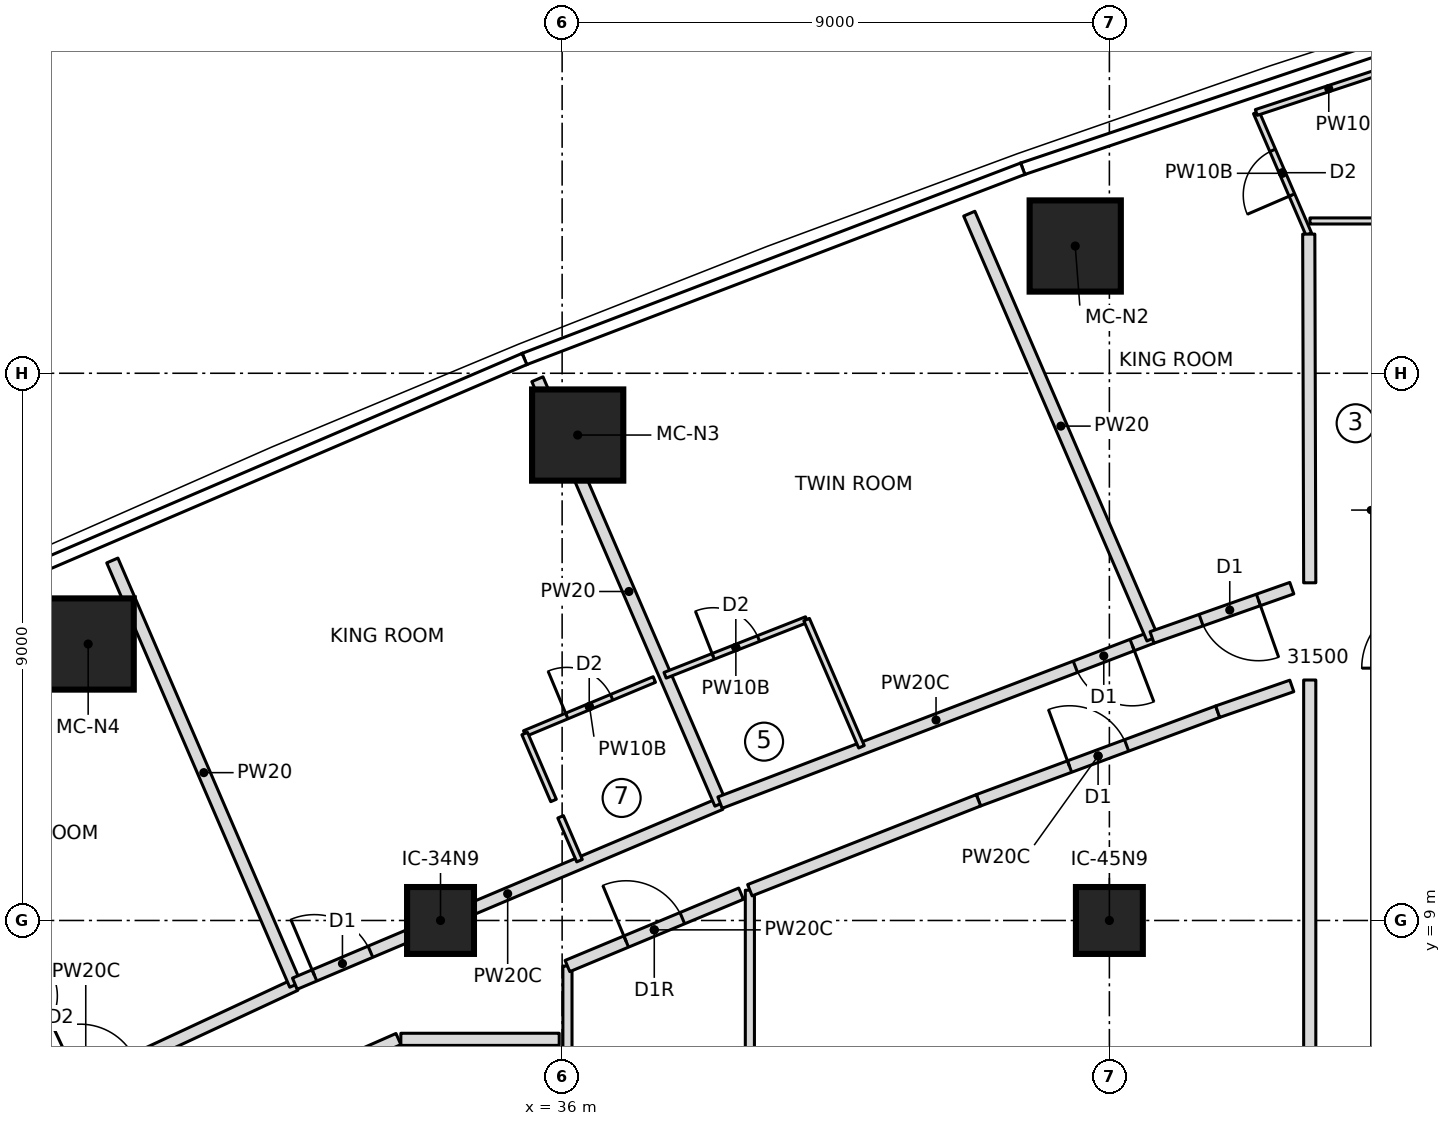
"""IFC4 building model, lengths in metres.
Left out: names, types, materials, properties, quantities, classifications, styles, units other than length and angle.
Written with IfcOpenShell. Run it as: python <this file> out.ifc"""

import sys

from ifc_helpers import new_model, si_unit, direction, frame, frame_2d, origin, origin_2d, place, context, subcontext, project, spatial, rectangle, extrude, element, fill, save


model = new_model("IFC4")
c1 = context("Model", 3, precision=1e-05, world=origin(), true_north=direction((0.0, 1.0)))
c2 = subcontext(c1, "Body", "Model", "MODEL_VIEW")
j1 = project(units=[si_unit("LENGTHUNIT", "METRE"), si_unit("PLANEANGLEUNIT", "RADIAN")], contexts=[c1])
p1 = place(None, origin())
s1 = spatial("IfcSite", under=j1, at=p1, CompositionType="ELEMENT")
p2 = place(p1, origin())
s2 = spatial("IfcBuilding", under=s1, at=p2, CompositionType="ELEMENT")
p3 = place(p2, frame((0.0, 0.0, 162.15)))
s3 = spatial("IfcBuildingStorey", under=s2, at=p3, CompositionType="ELEMENT", Elevation=162.15)
for number, where, z_axis, x_axis in (
    (1, (44.438, 20.093, 0.0), (0.0, 0.0, 1.0), (1.0, 0.0, 0.0)),
    (2, (36.256, 16.984, 0.0), (0.0, 0.0, 1.0), (1.0, 0.0, 0.0)),
    (3, (28.205, 13.547, 0.0), (0.0, 0.0, 1.0), (1.0, 0.0, 0.0)),
):
    element("IfcColumn", number, at=place(p3, frame(where, z_axis=z_axis, x_axis=x_axis)), inside=s3, PredefinedType="COLUMN", context=c2, shape_type="SweptSolid", body=[
        extrude(rectangle(XDim=1.5, YDim=1.5, at=origin_2d()), origin(), (0.0, 0.0, 1.0), 3.55),
    ])
for number, where, z_axis, x_axis in (
    (4, (34.0, 9.0, 0.0), (0.0, 0.0, 1.0), (1.0, 0.0, 0.0)),
    (5, (45.0, 9.0, 0.0), (0.0, 0.0, 1.0), (1.0, 0.0, 0.0)),
):
    element("IfcColumn", number, at=place(p3, frame(where, z_axis=z_axis, x_axis=x_axis)), inside=s3, PredefinedType="COLUMN", context=c2, shape_type="SweptSolid", body=[
        extrude(rectangle(XDim=1.1, YDim=1.1, at=origin_2d()), origin(), (0.0, 0.0, 1.0), 3.55),
    ])
p4 = place(p3, frame((24.719, 4.733, 0.0), z_axis=(0.0, 0.0, 1.0), x_axis=(0.906593711122, 0.422004553238, 0.0)))
e6 = element("IfcWall", 6, at=p4, inside=s3, PredefinedType="PARTITIONING", context=c2, shape_type="SweptSolid", body=[
    extrude(rectangle(XDim=7.603, YDim=0.2, at=frame_2d((3.802, 0.0))), origin(), (0.0, 0.0, 1.0), 3.15),
])
p5 = place(p4, frame((3.7, 0.0, 0.0)))
e7 = element("IfcOpeningElement", 7, at=p5, cuts=e6, PredefinedType="OPENING", context=c2, shape_type="SweptSolid", body=[
    extrude(rectangle(XDim=1.0, YDim=2.1, at=frame_2d((0.5, 1.05))), frame((0.0, 0.11, 0.0), z_axis=(0.0, -1.0, 0.0), x_axis=(1.0, 0.0, 0.0)), (0.0, 0.0, 1.0), 0.22),
])
p6 = place(p3, frame((26.503, 8.679, 0.0), z_axis=(0.0, 0.0, 1.0), x_axis=(0.396018464604, -0.918242547311, 0.0)))
e8 = element("IfcWall", 8, at=p6, inside=s3, PredefinedType="PARTITIONING", context=c2, shape_type="SweptSolid", body=[
    extrude(rectangle(XDim=2.778, YDim=0.1, at=frame_2d((1.389, 0.0))), origin(), (0.0, 0.0, 1.0), 3.15),
])
p7 = place(p6, frame((1.0, 0.0, 0.0)))
e9 = element("IfcOpeningElement", 9, at=p7, cuts=e8, PredefinedType="OPENING", context=c2, shape_type="SweptSolid", body=[
    extrude(rectangle(XDim=0.8, YDim=2.1, at=frame_2d((0.4, 1.05))), frame((0.0, 0.06, 0.0), z_axis=(0.0, -1.0, 0.0), x_axis=(1.0, 0.0, 0.0)), (0.0, 0.0, 1.0), 0.12),
])
p8 = place(p3, frame((31.612, 7.942, 0.0), z_axis=(0.0, 0.0, 1.0), x_axis=(-0.395976934703, 0.91826045716, 0.0)))
e10 = element("IfcWall", 10, at=p8, inside=s3, PredefinedType="PARTITIONING", context=c2, shape_type="SweptSolid", body=[
    extrude(rectangle(XDim=7.6, YDim=0.2, at=frame_2d((3.8, 0.0))), origin(), (0.0, 0.0, 1.0), 3.15),
])
p9 = place(p3, frame((31.604, 7.96, 0.0), z_axis=(0.0, 0.0, 1.0), x_axis=(0.921069634751, 0.389397904386, 0.0)))
e11 = element("IfcWall", 11, at=p9, inside=s3, PredefinedType="PARTITIONING", context=c2, shape_type="SweptSolid", body=[
    extrude(rectangle(XDim=7.6, YDim=0.2, at=frame_2d((3.8, 0.0))), origin(), (0.0, 0.0, 1.0), 3.15),
])
p10 = place(p9, frame((0.35, 0.0, 0.0)))
e12 = element("IfcOpeningElement", 12, at=p10, cuts=e11, PredefinedType="OPENING", context=c2, shape_type="SweptSolid", body=[
    extrude(rectangle(XDim=1.0, YDim=2.1, at=frame_2d((0.5, 1.05))), frame((0.0, 0.11, 0.0), z_axis=(0.0, -1.0, 0.0), x_axis=(1.0, 0.0, 0.0)), (0.0, 0.0, 1.0), 0.22),
])
p11 = place(p3, frame((35.384, 12.074, 0.0), z_axis=(0.0, 0.0, 1.0), x_axis=(0.923014363649, 0.384765492863, 0.0)))
e13 = element("IfcWall", 13, at=p11, inside=s3, PredefinedType="PARTITIONING", context=c2, shape_type="SweptSolid", body=[
    extrude(rectangle(XDim=2.31, YDim=0.1, at=frame_2d((1.155, 0.0))), origin(), (0.0, 0.0, 1.0), 3.15),
])
p12 = place(p11, frame((0.75, 0.0, 0.0)))
e14 = element("IfcOpeningElement", 14, at=p12, cuts=e13, PredefinedType="OPENING", context=c2, shape_type="SweptSolid", body=[
    extrude(rectangle(XDim=0.8, YDim=2.1, at=frame_2d((0.4, 1.05))), frame((0.0, 0.06, 0.0), z_axis=(0.0, -1.0, 0.0), x_axis=(1.0, 0.0, 0.0)), (0.0, 0.0, 1.0), 0.12),
])
p13 = place(p3, frame((36.286, 9.983, 0.0), z_axis=(0.0, 0.0, 1.0), x_axis=(-0.396019167007, 0.918242244379, 0.0)))
e15 = element("IfcWall", 15, at=p13, inside=s3, PredefinedType="PARTITIONING", context=c2, shape_type="SweptSolid", body=[
    extrude(rectangle(XDim=0.785, YDim=0.1, at=frame_2d((0.393, 0.0))), origin(), (0.0, 0.0, 1.0), 3.15),
])
p14 = place(p3, frame((35.859, 10.974, 0.0), z_axis=(0.0, 0.0, 1.0), x_axis=(-0.396057430794, 0.918225741043, 0.0)))
e16 = element("IfcWall", 16, at=p14, inside=s3, PredefinedType="PARTITIONING", context=c2, shape_type="SweptSolid", body=[
    extrude(rectangle(XDim=1.198, YDim=0.1, at=frame_2d((0.599, 0.0))), origin(), (0.0, 0.0, 1.0), 3.15),
])
p15 = place(p3, frame((38.604, 10.92, 0.0), z_axis=(0.0, 0.0, 1.0), x_axis=(-0.395975928923, 0.918260890877, 0.0)))
e17 = element("IfcWall", 17, at=p15, inside=s3, PredefinedType="PARTITIONING", context=c2, shape_type="SweptSolid", body=[
    extrude(rectangle(XDim=7.604, YDim=0.2, at=frame_2d((3.802, 0.0))), origin(), (0.0, 0.0, 1.0), 3.15),
])
p16 = place(p3, frame((45.702, 13.655, 0.0), z_axis=(0.0, 0.0, 1.0), x_axis=(-0.934032939798, -0.35718688018, 0.0)))
e18 = element("IfcWall", 18, at=p16, inside=s3, PredefinedType="PARTITIONING", context=c2, shape_type="SweptSolid", body=[
    extrude(rectangle(XDim=7.607, YDim=0.2, at=frame_2d((3.803, 0.0))), origin(), (0.0, 0.0, 1.0), 3.15),
])
p17 = place(p16, frame((0.35, 0.0, 0.0)))
e19 = element("IfcOpeningElement", 19, at=p17, cuts=e18, PredefinedType="OPENING", context=c2, shape_type="SweptSolid", body=[
    extrude(rectangle(XDim=1.0, YDim=2.1, at=frame_2d((0.5, 1.05))), frame((0.0, 0.11, 0.0), z_axis=(0.0, -1.0, 0.0), x_axis=(1.0, 0.0, 0.0)), (0.0, 0.0, 1.0), 0.22),
])
p18 = place(p3, frame((37.693, 13.033, 0.0), z_axis=(0.0, 0.0, 1.0), x_axis=(0.930568677441, 0.366117380856, 0.0)))
e20 = element("IfcWall", 20, at=p18, inside=s3, PredefinedType="PARTITIONING", context=c2, shape_type="SweptSolid", body=[
    extrude(rectangle(XDim=2.501, YDim=0.1, at=frame_2d((1.25, 0.0))), origin(), (0.0, 0.0, 1.0), 3.15),
])
p19 = place(p18, frame((0.85, 0.0, 0.0)))
e21 = element("IfcOpeningElement", 21, at=p19, cuts=e20, PredefinedType="OPENING", context=c2, shape_type="SweptSolid", body=[
    extrude(rectangle(XDim=0.8, YDim=2.1, at=frame_2d((0.4, 1.05))), frame((0.0, 0.06, 0.0), z_axis=(0.0, -1.0, 0.0), x_axis=(1.0, 0.0, 0.0)), (0.0, 0.0, 1.0), 0.12),
])
p20 = place(p3, frame((40.021, 13.948, 0.0), z_axis=(0.0, 0.0, 1.0), x_axis=(0.39596178423, -0.918266990275, 0.0)))
e22 = element("IfcWall", 22, at=p20, inside=s3, PredefinedType="PARTITIONING", context=c2, shape_type="SweptSolid", body=[
    extrude(rectangle(XDim=2.278, YDim=0.1, at=frame_2d((1.139, 0.0))), origin(), (0.0, 0.0, 1.0), 3.15),
])
p21 = place(p3, frame((45.709, 13.637, 0.0), z_axis=(0.0, 0.0, 1.0), x_axis=(-0.395993528256, 0.918253301426, 0.0)))
e23 = element("IfcWall", 23, at=p21, inside=s3, PredefinedType="PARTITIONING", context=c2, shape_type="SweptSolid", body=[
    extrude(rectangle(XDim=7.61, YDim=0.2, at=frame_2d((3.805, 0.0))), origin(), (0.0, 0.0, 1.0), 3.15),
])
p22 = place(p3, frame((48.279, 20.289, 0.0), z_axis=(0.0, 0.0, 1.0), x_axis=(-0.396028123143, 0.918238381729, 0.0)))
e24 = element("IfcWall", 24, at=p22, inside=s3, PredefinedType="PARTITIONING", context=c2, shape_type="SweptSolid", body=[
    extrude(rectangle(XDim=2.179, YDim=0.1, at=frame_2d((1.089, 0.0))), origin(), (0.0, 0.0, 1.0), 3.15),
])
p23 = place(p22, frame((0.7, 0.0, 0.0)))
e25 = element("IfcOpeningElement", 25, at=p23, cuts=e24, PredefinedType="OPENING", context=c2, shape_type="SweptSolid", body=[
    extrude(rectangle(XDim=0.8, YDim=2.1, at=frame_2d((0.4, 1.05))), frame((0.0, 0.06, 0.0), z_axis=(0.0, -1.0, 0.0), x_axis=(1.0, 0.0, 0.0)), (0.0, 0.0, 1.0), 0.12),
])
p24 = place(p3, frame((31.231, 6.135, 0.0), z_axis=(0.0, 0.0, 1.0), x_axis=(0.915102334452, 0.403221672881, 0.0)))
e26 = element("IfcWall", 26, at=p24, inside=s3, PredefinedType="PARTITIONING", context=c2, shape_type="SweptSolid", body=[
    extrude(rectangle(XDim=2.269, YDim=0.2, at=frame_2d((1.135, 0.0))), origin(), (0.0, 0.0, 1.0), 3.15),
])
p25 = place(p3, frame((36.087, -8.25, 0.0), z_axis=(0.0, 0.0, 1.0), x_axis=(0.0, 1.0, 0.0)))
e27 = element("IfcWall", 27, at=p25, inside=s3, PredefinedType="PARTITIONING", context=c2, shape_type="SweptSolid", body=[
    extrude(rectangle(XDim=16.501, YDim=0.15, at=frame_2d((8.25, 0.0))), origin(), (0.0, 0.0, 1.0), 3.15),
])
p26 = place(p3, frame((36.087, 8.25, 0.0), z_axis=(0.0, 0.0, 1.0), x_axis=(0.923013875818, 0.384766663118, 0.0)))
e28 = element("IfcWall", 28, at=p26, inside=s3, PredefinedType="PARTITIONING", context=c2, shape_type="SweptSolid", body=[
    extrude(rectangle(XDim=3.094, YDim=0.2, at=frame_2d((1.547, 0.0))), origin(), (0.0, 0.0, 1.0), 3.15),
])
p27 = place(p26, frame((1.047, 0.0, 0.0)))
e29 = element("IfcOpeningElement", 29, at=p27, cuts=e28, PredefinedType="OPENING", context=c2, shape_type="SweptSolid", body=[
    extrude(rectangle(XDim=1.0, YDim=2.1, at=frame_2d((0.5, 1.05))), frame((0.0, 0.11, 0.0), z_axis=(0.0, -1.0, 0.0), x_axis=(1.0, 0.0, 0.0)), (0.0, 0.0, 1.0), 0.22),
])
p28 = place(p3, frame((39.087, -9.498, 0.0), z_axis=(0.0, 0.0, 1.0), x_axis=(0.0, 1.0, 0.0)))
e30 = element("IfcWall", 30, at=p28, inside=s3, PredefinedType="PARTITIONING", context=c2, shape_type="SweptSolid", body=[
    extrude(rectangle(XDim=18.996, YDim=0.15, at=frame_2d((9.498, 0.0))), origin(), (0.0, 0.0, 1.0), 3.15),
])
p29 = place(p3, frame((42.847, 10.977, 0.0), z_axis=(0.0, 0.0, 1.0), x_axis=(0.937732614305, 0.347357948044, 0.0)))
e31 = element("IfcWall", 31, at=p29, inside=s3, PredefinedType="PARTITIONING", context=c2, shape_type="SweptSolid", body=[
    extrude(rectangle(XDim=4.195, YDim=0.2, at=frame_2d((2.098, 0.0))), origin(), (0.0, 0.0, 1.0), 3.15),
])
p30 = place(p29, frame((1.598, 0.0, 0.0)))
e32 = element("IfcOpeningElement", 32, at=p30, cuts=e31, PredefinedType="OPENING", context=c2, shape_type="SweptSolid", body=[
    extrude(rectangle(XDim=1.0, YDim=2.1, at=frame_2d((0.5, 1.05))), frame((0.0, 0.11, 0.0), z_axis=(0.0, -1.0, 0.0), x_axis=(1.0, 0.0, 0.0)), (0.0, 0.0, 1.0), 0.22),
])
p31 = place(p3, frame((39.087, 9.498, 0.0), z_axis=(0.0, 0.0, 1.0), x_axis=(0.930586875578, 0.366071122873, 0.0)))
e33 = element("IfcWall", 33, at=p31, inside=s3, PredefinedType="PARTITIONING", context=c2, shape_type="SweptSolid", body=[
    extrude(rectangle(XDim=4.04, YDim=0.2, at=frame_2d((2.02, 0.0))), origin(), (0.0, 0.0, 1.0), 3.15),
])
p32 = place(p3, frame((49.434, 20.505, 0.0), z_axis=(0.0, 0.0, 1.0), x_axis=(-1.0, 0.0, 0.0)))
e34 = element("IfcWall", 34, at=p32, inside=s3, PredefinedType="PARTITIONING", context=c2, shape_type="SweptSolid", body=[
    extrude(rectangle(XDim=1.135, YDim=0.1, at=frame_2d((0.568, 0.0))), origin(), (0.0, 0.0, 1.0), 3.15),
])
p33 = place(p3, frame((47.416, 22.289, 0.0), z_axis=(0.0, 0.0, 1.0), x_axis=(0.949844078437, 0.312723882455, 0.0)))
e35 = element("IfcWall", 35, at=p33, inside=s3, PredefinedType="PARTITIONING", context=c2, shape_type="SweptSolid", body=[
    extrude(rectangle(XDim=2.51, YDim=0.1, at=frame_2d((1.255, 0.0))), origin(), (0.0, 0.0, 1.0), 3.15),
])
p34 = place(p3, frame((48.0, 14.466, 0.0), z_axis=(0.0, 0.0, 1.0), x_axis=(-0.94307168041, -0.332589545248, 0.0)))
e36 = element("IfcWall", 36, at=p34, inside=s3, PredefinedType="PARTITIONING", context=c2, shape_type="SweptSolid", body=[
    extrude(rectangle(XDim=2.437, YDim=0.2, at=frame_2d((1.219, 0.0))), origin(), (0.0, 0.0, 1.0), 3.15),
])
p35 = place(p34, frame((0.582, 0.0, 0.0)))
e37 = element("IfcOpeningElement", 37, at=p35, cuts=e36, PredefinedType="OPENING", context=c2, shape_type="SweptSolid", body=[
    extrude(rectangle(XDim=1.0, YDim=2.1, at=frame_2d((0.5, 1.05))), frame((0.0, 0.11, 0.0), z_axis=(0.0, -1.0, 0.0), x_axis=(1.0, 0.0, 0.0)), (0.0, 0.0, 1.0), 0.22),
])
p36 = place(p3, frame((46.781, 12.434, 0.0), z_axis=(0.0, 0.0, 1.0), x_axis=(0.944517215109, 0.328461916152, 0.0)))
e38 = element("IfcWall", 38, at=p36, inside=s3, PredefinedType="PARTITIONING", context=c2, shape_type="SweptSolid", body=[
    extrude(rectangle(XDim=1.29, YDim=0.2, at=frame_2d((0.645, 0.0))), origin(), (0.0, 0.0, 1.0), 3.15),
])
p37 = place(p3, frame((33.347, 7.045, 0.0), z_axis=(0.0, 0.0, 1.0), x_axis=(0.999999982426, 0.000187476562, 0.0)))
e39 = element("IfcWall", 39, at=p37, inside=s3, PredefinedType="PARTITIONING", context=c2, shape_type="SweptSolid", body=[
    extrude(rectangle(XDim=2.604, YDim=0.2, at=frame_2d((1.302, 0.0))), origin(), (0.0, 0.0, 1.0), 3.15),
])
p38 = place(p3, frame((48.295, 12.955, 0.0), z_axis=(0.0, 0.0, 1.0), x_axis=(0.0, -1.0, 0.0)))
e40 = element("IfcWall", 40, at=p38, inside=s3, PredefinedType="PARTITIONING", context=c2, shape_type="SweptSolid", body=[
    extrude(rectangle(XDim=25.91, YDim=0.2, at=frame_2d((12.955, 0.0))), origin(), (0.0, 0.0, 1.0), 3.15),
])
p39 = place(p3, frame((48.279, 20.289, 0.0), z_axis=(0.0, 0.0, 1.0), x_axis=(0.002809695168, -0.999996052799, 0.0)))
e41 = element("IfcWall", 41, at=p39, inside=s3, PredefinedType="PARTITIONING", context=c2, shape_type="SweptSolid", body=[
    extrude(rectangle(XDim=5.735, YDim=0.2, at=frame_2d((2.867, 0.0))), origin(), (0.0, 0.0, 1.0), 3.15),
])
p40 = place(p12, origin())
e42 = element("IfcDoor", 42, at=p40, inside=s3, OperationType="SINGLE_SWING_LEFT", PredefinedType="DOOR", context=c2, shape_type="SweptSolid", body=[
    extrude(rectangle(XDim=0.8, YDim=2.1, at=frame_2d((0.4, 1.05))), frame((0.0, 0.025, 0.0), z_axis=(0.0, -1.0, 0.0), x_axis=(1.0, 0.0, 0.0)), (0.0, 0.0, 1.0), 0.05),
])
fill(e14, e42)
p41 = place(p10, origin())
e43 = element("IfcDoor", 43, at=p41, inside=s3, OperationType="SINGLE_SWING_LEFT", PredefinedType="DOOR", context=c2, shape_type="SweptSolid", body=[
    extrude(rectangle(XDim=1.0, YDim=2.1, at=frame_2d((0.5, 1.05))), frame((0.0, 0.025, 0.0), z_axis=(0.0, -1.0, 0.0), x_axis=(1.0, 0.0, 0.0)), (0.0, 0.0, 1.0), 0.05),
])
fill(e12, e43)
p42 = place(p19, origin())
e44 = element("IfcDoor", 44, at=p42, inside=s3, OperationType="SINGLE_SWING_LEFT", PredefinedType="DOOR", context=c2, shape_type="SweptSolid", body=[
    extrude(rectangle(XDim=0.8, YDim=2.1, at=frame_2d((0.4, 1.05))), frame((0.0, 0.025, 0.0), z_axis=(0.0, -1.0, 0.0), x_axis=(1.0, 0.0, 0.0)), (0.0, 0.0, 1.0), 0.05),
])
fill(e21, e44)
p43 = place(p17, origin())
e45 = element("IfcDoor", 45, at=p43, inside=s3, OperationType="SINGLE_SWING_LEFT", PredefinedType="DOOR", context=c2, shape_type="SweptSolid", body=[
    extrude(rectangle(XDim=1.0, YDim=2.1, at=frame_2d((0.5, 1.05))), frame((0.0, 0.025, 0.0), z_axis=(0.0, -1.0, 0.0), x_axis=(1.0, 0.0, 0.0)), (0.0, 0.0, 1.0), 0.05),
])
fill(e19, e45)
p44 = place(p23, origin())
e46 = element("IfcDoor", 46, at=p44, inside=s3, OperationType="SINGLE_SWING_LEFT", PredefinedType="DOOR", context=c2, shape_type="SweptSolid", body=[
    extrude(rectangle(XDim=0.8, YDim=2.1, at=frame_2d((0.4, 1.05))), frame((0.0, 0.025, 0.0), z_axis=(0.0, -1.0, 0.0), x_axis=(1.0, 0.0, 0.0)), (0.0, 0.0, 1.0), 0.05),
])
fill(e25, e46)
p45 = place(p35, origin())
e47 = element("IfcDoor", 47, at=p45, inside=s3, OperationType="SINGLE_SWING_LEFT", PredefinedType="DOOR", context=c2, shape_type="SweptSolid", body=[
    extrude(rectangle(XDim=1.0, YDim=2.1, at=frame_2d((0.5, 1.05))), frame((0.0, 0.025, 0.0), z_axis=(0.0, -1.0, 0.0), x_axis=(1.0, 0.0, 0.0)), (0.0, 0.0, 1.0), 0.05),
])
fill(e37, e47)
p46 = place(p27, origin())
e48 = element("IfcDoor", 48, at=p46, inside=s3, OperationType="SINGLE_SWING_RIGHT", PredefinedType="DOOR", context=c2, shape_type="SweptSolid", body=[
    extrude(rectangle(XDim=1.0, YDim=2.1, at=frame_2d((0.5, 1.05))), frame((0.0, 0.025, 0.0), z_axis=(0.0, -1.0, 0.0), x_axis=(1.0, 0.0, 0.0)), (0.0, 0.0, 1.0), 0.05),
])
fill(e29, e48)
p47 = place(p30, origin())
e49 = element("IfcDoor", 49, at=p47, inside=s3, OperationType="SINGLE_SWING_LEFT", PredefinedType="DOOR", context=c2, shape_type="SweptSolid", body=[
    extrude(rectangle(XDim=1.0, YDim=2.1, at=frame_2d((0.5, 1.05))), frame((0.0, 0.025, 0.0), z_axis=(0.0, -1.0, 0.0), x_axis=(1.0, 0.0, 0.0)), (0.0, 0.0, 1.0), 0.05),
])
fill(e32, e49)
save(model, sys.argv[1])
